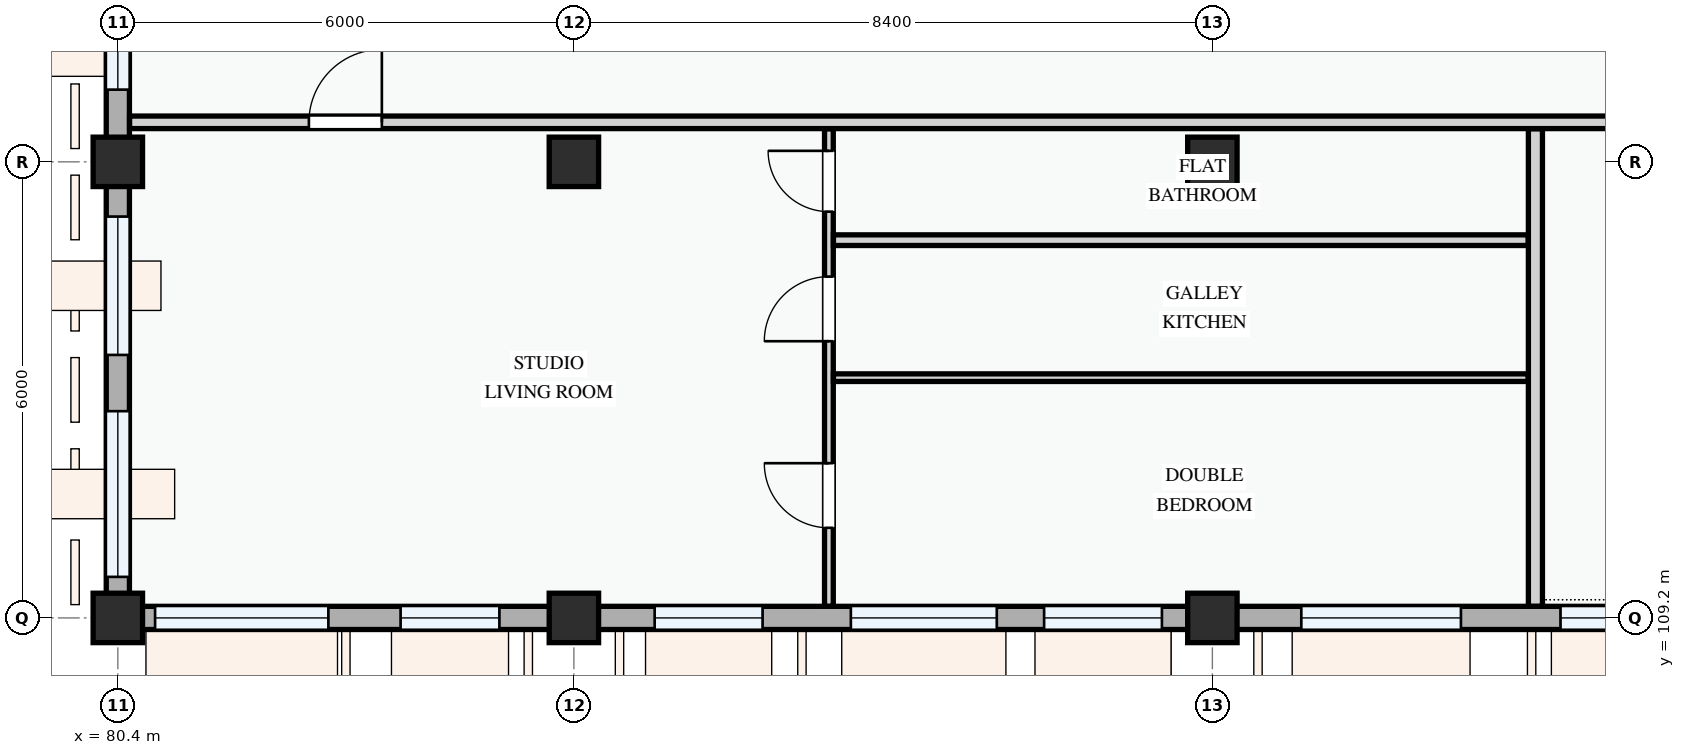
"""IFC4 building model, lengths in metres.
Left out: names, types, materials, properties, quantities, classifications, styles, units other than length and angle.
Written with IfcOpenShell. Run it as: python <this file> out.ifc"""

import sys

from ifc_helpers import new_model, si_unit, direction, frame, frame_2d, origin, origin_2d, place, context, subcontext, project, spatial, rectangle, extrude, element, fill, save


model = new_model("IFC4")
c1 = context("Model", 3, precision=1e-05, world=origin(), true_north=direction((0.0, 1.0)))
c2 = subcontext(c1, "Body", "Model", "MODEL_VIEW")
j1 = project(units=[si_unit("LENGTHUNIT", "METRE"), si_unit("PLANEANGLEUNIT", "RADIAN")], contexts=[c1])
p1 = place(None, origin())
s1 = spatial("IfcSite", under=j1, at=p1, CompositionType="ELEMENT")
p2 = place(p1, origin())
s2 = spatial("IfcBuilding", under=s1, at=p2, CompositionType="ELEMENT")
p3 = place(p2, frame((0.0, 0.0, 21.3)))
s3 = spatial("IfcBuildingStorey", under=s2, at=p3, CompositionType="ELEMENT", Elevation=21.3)
for number, where, z_axis, x_axis in (
    (1, (80.4, 109.2, 0.0), (0.0, 0.0, 1.0), (1.0, 0.0, 0.0)),
    (2, (80.4, 115.2, 0.0), (0.0, 0.0, 1.0), (1.0, 0.0, 0.0)),
    (3, (86.4, 109.2, 0.0), (0.0, 0.0, 1.0), (1.0, 0.0, 0.0)),
    (4, (86.4, 115.2, 0.0), (0.0, 0.0, 1.0), (1.0, 0.0, 0.0)),
    (5, (94.8, 109.2, 0.0), (0.0, 0.0, 1.0), (1.0, 0.0, 0.0)),
    (6, (94.8, 115.2, 0.0), (0.0, 0.0, 1.0), (1.0, 0.0, 0.0)),
):
    element("IfcColumn", number, at=place(p3, frame(where, z_axis=z_axis, x_axis=x_axis)), inside=s3, PredefinedType="COLUMN", context=c2, shape_type="SweptSolid", body=[
        extrude(rectangle(XDim=0.65, YDim=0.65, at=origin_2d()), origin(), (0.0, 0.0, 1.0), 3.3),
    ])
p4 = place(p3, frame((80.4, 123.6, 0.0), z_axis=(0.0, 0.0, 1.0), x_axis=(0.0, -1.0, 0.0)))
e7 = element("IfcWall", 7, at=p4, inside=s3, PredefinedType="STANDARD", context=c2, shape_type="SweptSolid", body=[
    extrude(rectangle(XDim=8.4, YDim=0.305, at=frame_2d((4.2, 0.0))), origin(), (0.0, 0.0, 1.0), 2.425),
])
p5 = place(p4, frame((0.893, 0.0, 0.78)))
e8 = element("IfcOpeningElement", 8, at=p5, cuts=e7, PredefinedType="OPENING", context=c2, shape_type="SweptSolid", body=[
    extrude(rectangle(XDim=1.58, YDim=1.48, at=frame_2d((0.79, 0.74))), frame((0.0, 0.163, 0.0), z_axis=(0.0, -1.0, 0.0), x_axis=(1.0, 0.0, 0.0)), (0.0, 0.0, 1.0), 0.325),
])
p6 = place(p4, frame((3.567, 0.0, 0.78)))
e9 = element("IfcOpeningElement", 9, at=p6, cuts=e7, PredefinedType="OPENING", context=c2, shape_type="SweptSolid", body=[
    extrude(rectangle(XDim=1.92, YDim=1.44, at=frame_2d((0.96, 0.72))), frame((0.0, 0.163, 0.0), z_axis=(0.0, -1.0, 0.0), x_axis=(1.0, 0.0, 0.0)), (0.0, 0.0, 1.0), 0.325),
])
p7 = place(p4, frame((6.45, 0.0, 0.78)))
e10 = element("IfcOpeningElement", 10, at=p7, cuts=e7, PredefinedType="OPENING", context=c2, shape_type="SweptSolid", body=[
    extrude(rectangle(XDim=1.0, YDim=1.25, at=frame_2d((0.5, 0.625))), frame((0.0, 0.163, 0.0), z_axis=(0.0, -1.0, 0.0), x_axis=(1.0, 0.0, 0.0)), (0.0, 0.0, 1.0), 0.325),
])
p8 = place(p3, frame((80.4, 115.2, 0.0), z_axis=(0.0, 0.0, 1.0), x_axis=(0.0, -1.0, 0.0)))
e11 = element("IfcWall", 11, at=p8, inside=s3, PredefinedType="STANDARD", context=c2, shape_type="SweptSolid", body=[
    extrude(rectangle(XDim=6.0, YDim=0.305, at=frame_2d((3.0, 0.0))), origin(), (0.0, 0.0, 1.0), 2.575),
])
p9 = place(p8, frame((0.72, 0.0, 0.78)))
e12 = element("IfcOpeningElement", 12, at=p9, cuts=e11, PredefinedType="OPENING", context=c2, shape_type="SweptSolid", body=[
    extrude(rectangle(XDim=1.82, YDim=1.46, at=frame_2d((0.91, 0.73))), frame((0.0, 0.163, 0.0), z_axis=(0.0, -1.0, 0.0), x_axis=(1.0, 0.0, 0.0)), (0.0, 0.0, 1.0), 0.325),
])
p10 = place(p8, frame((3.28, 0.0, 0.78)))
e13 = element("IfcOpeningElement", 13, at=p10, cuts=e11, PredefinedType="OPENING", context=c2, shape_type="SweptSolid", body=[
    extrude(rectangle(XDim=2.18, YDim=1.48, at=frame_2d((1.09, 0.74))), frame((0.0, 0.163, 0.0), z_axis=(0.0, -1.0, 0.0), x_axis=(1.0, 0.0, 0.0)), (0.0, 0.0, 1.0), 0.325),
])
p11 = place(p3, frame((80.4, 109.2, 0.0), z_axis=(0.0, 0.0, 1.0), x_axis=(1.0, 0.0, 0.0)))
e14 = element("IfcWall", 14, at=p11, inside=s3, PredefinedType="STANDARD", context=c2, shape_type="SweptSolid", body=[
    extrude(rectangle(XDim=6.0, YDim=0.305, at=frame_2d((3.0, 0.0))), origin(), (0.0, 0.0, 1.0), 2.475),
])
p12 = place(p11, frame((0.49, 0.0, 0.78)))
e15 = element("IfcOpeningElement", 15, at=p12, cuts=e14, PredefinedType="OPENING", context=c2, shape_type="SweptSolid", body=[
    extrude(rectangle(XDim=2.28, YDim=1.46, at=frame_2d((1.14, 0.73))), frame((0.0, 0.163, 0.0), z_axis=(0.0, -1.0, 0.0), x_axis=(1.0, 0.0, 0.0)), (0.0, 0.0, 1.0), 0.325),
])
p13 = place(p11, frame((3.72, 0.0, 0.78)))
e16 = element("IfcOpeningElement", 16, at=p13, cuts=e14, PredefinedType="OPENING", context=c2, shape_type="SweptSolid", body=[
    extrude(rectangle(XDim=1.3, YDim=1.4, at=frame_2d((0.65, 0.7))), frame((0.0, 0.163, 0.0), z_axis=(0.0, -1.0, 0.0), x_axis=(1.0, 0.0, 0.0)), (0.0, 0.0, 1.0), 0.325),
])
p14 = place(p3, frame((86.4, 109.2, 0.0), z_axis=(0.0, 0.0, 1.0), x_axis=(1.0, 0.0, 0.0)))
e17 = element("IfcWall", 17, at=p14, inside=s3, PredefinedType="STANDARD", context=c2, shape_type="SweptSolid", body=[
    extrude(rectangle(XDim=8.4, YDim=0.305, at=frame_2d((4.2, 0.0))), origin(), (0.0, 0.0, 1.0), 2.375),
])
p15 = place(p14, frame((1.062, 0.0, 0.78)))
e18 = element("IfcOpeningElement", 18, at=p15, cuts=e17, PredefinedType="OPENING", context=c2, shape_type="SweptSolid", body=[
    extrude(rectangle(XDim=1.42, YDim=1.38, at=frame_2d((0.71, 0.69))), frame((0.0, 0.163, 0.0), z_axis=(0.0, -1.0, 0.0), x_axis=(1.0, 0.0, 0.0)), (0.0, 0.0, 1.0), 0.325),
])
p16 = place(p14, frame((3.644, 0.0, 0.78)))
e19 = element("IfcOpeningElement", 19, at=p16, cuts=e17, PredefinedType="OPENING", context=c2, shape_type="SweptSolid", body=[
    extrude(rectangle(XDim=1.92, YDim=1.44, at=frame_2d((0.96, 0.72))), frame((0.0, 0.163, 0.0), z_axis=(0.0, -1.0, 0.0), x_axis=(1.0, 0.0, 0.0)), (0.0, 0.0, 1.0), 0.325),
])
p17 = place(p14, frame((6.186, 0.0, 0.78)))
e20 = element("IfcOpeningElement", 20, at=p17, cuts=e17, PredefinedType="OPENING", context=c2, shape_type="SweptSolid", body=[
    extrude(rectangle(XDim=1.55, YDim=1.4, at=frame_2d((0.775, 0.7))), frame((0.0, 0.163, 0.0), z_axis=(0.0, -1.0, 0.0), x_axis=(1.0, 0.0, 0.0)), (0.0, 0.0, 1.0), 0.325),
])
p18 = place(p3, frame((94.8, 109.2, 0.0), z_axis=(0.0, 0.0, 1.0), x_axis=(1.0, 0.0, 0.0)))
e21 = element("IfcWall", 21, at=p18, inside=s3, PredefinedType="STANDARD", context=c2, shape_type="SweptSolid", body=[
    extrude(rectangle(XDim=6.0, YDim=0.305, at=frame_2d((3.0, 0.0))), origin(), (0.0, 0.0, 1.0), 2.475),
])
p19 = place(p18, frame((1.17, 0.0, 0.78)))
e22 = element("IfcOpeningElement", 22, at=p19, cuts=e21, PredefinedType="OPENING", context=c2, shape_type="SweptSolid", body=[
    extrude(rectangle(XDim=2.1, YDim=1.55, at=frame_2d((1.05, 0.775))), frame((0.0, 0.163, 0.0), z_axis=(0.0, -1.0, 0.0), x_axis=(1.0, 0.0, 0.0)), (0.0, 0.0, 1.0), 0.325),
])
p20 = place(p18, frame((4.58, 0.0, 0.78)))
e23 = element("IfcOpeningElement", 23, at=p20, cuts=e21, PredefinedType="OPENING", context=c2, shape_type="SweptSolid", body=[
    extrude(rectangle(XDim=0.9, YDim=1.2, at=frame_2d((0.45, 0.6))), frame((0.0, 0.163, 0.0), z_axis=(0.0, -1.0, 0.0), x_axis=(1.0, 0.0, 0.0)), (0.0, 0.0, 1.0), 0.325),
])
p21 = place(p3, frame((89.755, 109.354, 0.0), z_axis=(0.0, 0.0, 1.0), x_axis=(0.0, 1.0, 0.0)))
e24 = element("IfcWall", 24, at=p21, inside=s3, PredefinedType="PARTITIONING", context=c2, shape_type="SweptSolid", body=[
    extrude(rectangle(XDim=6.281, YDim=0.115, at=frame_2d((3.141, 0.0))), origin(), (0.0, 0.0, 1.0), 3.0),
])
p22 = place(p21, frame((1.031, 0.0, 0.0)))
e25 = element("IfcOpeningElement", 25, at=p22, cuts=e24, PredefinedType="OPENING", context=c2, shape_type="SweptSolid", body=[
    extrude(rectangle(XDim=0.85, YDim=2.1, at=frame_2d((0.425, 1.05))), frame((0.0, 0.067, 0.0), z_axis=(0.0, -1.0, 0.0), x_axis=(1.0, 0.0, 0.0)), (0.0, 0.0, 1.0), 0.135),
])
p23 = place(p21, frame((3.486, 0.0, 0.0)))
e26 = element("IfcOpeningElement", 26, at=p23, cuts=e24, PredefinedType="OPENING", context=c2, shape_type="SweptSolid", body=[
    extrude(rectangle(XDim=0.85, YDim=2.1, at=frame_2d((0.425, 1.05))), frame((0.0, 0.067, 0.0), z_axis=(0.0, -1.0, 0.0), x_axis=(1.0, 0.0, 0.0)), (0.0, 0.0, 1.0), 0.135),
])
p24 = place(p21, frame((5.19, 0.0, 0.0)))
e27 = element("IfcOpeningElement", 27, at=p24, cuts=e24, PredefinedType="OPENING", context=c2, shape_type="SweptSolid", body=[
    extrude(rectangle(XDim=0.8, YDim=2.1, at=frame_2d((0.4, 1.05))), frame((0.0, 0.067, 0.0), z_axis=(0.0, -1.0, 0.0), x_axis=(1.0, 0.0, 0.0)), (0.0, 0.0, 1.0), 0.135),
])
p25 = place(p3, frame((89.814, 112.361, 0.0), z_axis=(0.0, 0.0, 1.0), x_axis=(1.0, 0.0, 0.0)))
e28 = element("IfcWall", 28, at=p25, inside=s3, PredefinedType="PARTITIONING", context=c2, shape_type="SweptSolid", body=[
    extrude(rectangle(XDim=9.141, YDim=0.1, at=frame_2d((4.571, 0.0))), origin(), (0.0, 0.0, 1.0), 3.0),
])
p26 = place(p3, frame((89.814, 114.17, 0.0), z_axis=(0.0, 0.0, 1.0), x_axis=(1.0, 0.0, 0.0)))
e29 = element("IfcWall", 29, at=p26, inside=s3, PredefinedType="PARTITIONING", context=c2, shape_type="SweptSolid", body=[
    extrude(rectangle(XDim=9.141, YDim=0.14, at=frame_2d((4.571, 0.0))), origin(), (0.0, 0.0, 1.0), 3.0),
])
p27 = place(p3, frame((99.05, 109.354, 0.0), z_axis=(0.0, 0.0, 1.0), x_axis=(0.0, 1.0, 0.0)))
e30 = element("IfcWall", 30, at=p27, inside=s3, PredefinedType="PARTITIONING", context=c2, shape_type="SweptSolid", body=[
    extrude(rectangle(XDim=6.281, YDim=0.185, at=frame_2d((3.141, 0.0))), origin(), (0.0, 0.0, 1.0), 3.0),
])
p28 = place(p3, frame((80.554, 115.72, 0.0), z_axis=(0.0, 0.0, 1.0), x_axis=(1.0, 0.0, 0.0)))
e31 = element("IfcWall", 31, at=p28, inside=s3, PredefinedType="PARTITIONING", context=c2, shape_type="SweptSolid", body=[
    extrude(rectangle(XDim=69.496, YDim=0.165, at=frame_2d((34.748, 0.0))), origin(), (0.0, 0.0, 1.0), 3.0),
])
p29 = place(p28, frame((2.359, 0.0, 0.0)))
e32 = element("IfcOpeningElement", 32, at=p29, cuts=e31, PredefinedType="OPENING", context=c2, shape_type="SweptSolid", body=[
    extrude(rectangle(XDim=0.96, YDim=2.12, at=frame_2d((0.48, 1.06))), frame((0.0, 0.093, 0.0), z_axis=(0.0, -1.0, 0.0), x_axis=(1.0, 0.0, 0.0)), (0.0, 0.0, 1.0), 0.185),
])
p30 = place(p28, frame((23.96, 0.0, 0.0)))
e33 = element("IfcOpeningElement", 33, at=p30, cuts=e31, PredefinedType="OPENING", context=c2, shape_type="SweptSolid", body=[
    extrude(rectangle(XDim=0.92, YDim=2.1, at=frame_2d((0.46, 1.05))), frame((0.0, 0.093, 0.0), z_axis=(0.0, -1.0, 0.0), x_axis=(1.0, 0.0, 0.0)), (0.0, 0.0, 1.0), 0.185),
])
p31 = place(p28, frame((39.125, 0.0, 0.0)))
e34 = element("IfcOpeningElement", 34, at=p31, cuts=e31, PredefinedType="OPENING", context=c2, shape_type="SweptSolid", body=[
    extrude(rectangle(XDim=0.92, YDim=2.1, at=frame_2d((0.46, 1.05))), frame((0.0, 0.093, 0.0), z_axis=(0.0, -1.0, 0.0), x_axis=(1.0, 0.0, 0.0)), (0.0, 0.0, 1.0), 0.185),
])
p32 = place(p28, frame((59.901, 0.0, 0.0)))
e35 = element("IfcOpeningElement", 35, at=p32, cuts=e31, PredefinedType="OPENING", context=c2, shape_type="SweptSolid", body=[
    extrude(rectangle(XDim=0.92, YDim=2.1, at=frame_2d((0.46, 1.05))), frame((0.0, 0.093, 0.0), z_axis=(0.0, -1.0, 0.0), x_axis=(1.0, 0.0, 0.0)), (0.0, 0.0, 1.0), 0.185),
])
p33 = place(p7, origin())
e36 = element("IfcWindow", 36, at=p33, inside=s3, PartitioningType="SINGLE_PANEL", PredefinedType="WINDOW", context=c2, shape_type="SweptSolid", body=[
    extrude(rectangle(XDim=1.0, YDim=1.25, at=frame_2d((0.5, 0.625))), frame((0.0, 0.03, 0.0), z_axis=(0.0, -1.0, 0.0), x_axis=(1.0, 0.0, 0.0)), (0.0, 0.0, 1.0), 0.06),
])
fill(e10, e36)
p34 = place(p9, origin())
e37 = element("IfcWindow", 37, at=p34, inside=s3, PartitioningType="DOUBLE_PANEL_VERTICAL", PredefinedType="WINDOW", context=c2, shape_type="SweptSolid", body=[
    extrude(rectangle(XDim=1.82, YDim=1.46, at=frame_2d((0.91, 0.73))), frame((0.0, 0.03, 0.0), z_axis=(0.0, -1.0, 0.0), x_axis=(1.0, 0.0, 0.0)), (0.0, 0.0, 1.0), 0.06),
])
fill(e12, e37)
p35 = place(p10, origin())
e38 = element("IfcWindow", 38, at=p35, inside=s3, PartitioningType="DOUBLE_PANEL_VERTICAL", PredefinedType="WINDOW", context=c2, shape_type="SweptSolid", body=[
    extrude(rectangle(XDim=2.18, YDim=1.48, at=frame_2d((1.09, 0.74))), frame((0.0, 0.03, 0.0), z_axis=(0.0, -1.0, 0.0), x_axis=(1.0, 0.0, 0.0)), (0.0, 0.0, 1.0), 0.06),
])
fill(e13, e38)
p36 = place(p12, origin())
e39 = element("IfcWindow", 39, at=p36, inside=s3, PartitioningType="DOUBLE_PANEL_VERTICAL", PredefinedType="WINDOW", context=c2, shape_type="SweptSolid", body=[
    extrude(rectangle(XDim=2.28, YDim=1.46, at=frame_2d((1.14, 0.73))), frame((0.0, 0.03, 0.0), z_axis=(0.0, -1.0, 0.0), x_axis=(1.0, 0.0, 0.0)), (0.0, 0.0, 1.0), 0.06),
])
fill(e15, e39)
p37 = place(p13, origin())
e40 = element("IfcWindow", 40, at=p37, inside=s3, PartitioningType="SINGLE_PANEL", PredefinedType="WINDOW", context=c2, shape_type="SweptSolid", body=[
    extrude(rectangle(XDim=1.3, YDim=1.4, at=frame_2d((0.65, 0.7))), frame((0.0, 0.03, 0.0), z_axis=(0.0, -1.0, 0.0), x_axis=(1.0, 0.0, 0.0)), (0.0, 0.0, 1.0), 0.06),
])
fill(e16, e40)
p38 = place(p15, origin())
e41 = element("IfcWindow", 41, at=p38, inside=s3, PartitioningType="SINGLE_PANEL", PredefinedType="WINDOW", context=c2, shape_type="SweptSolid", body=[
    extrude(rectangle(XDim=1.42, YDim=1.38, at=frame_2d((0.71, 0.69))), frame((0.0, 0.03, 0.0), z_axis=(0.0, -1.0, 0.0), x_axis=(1.0, 0.0, 0.0)), (0.0, 0.0, 1.0), 0.06),
])
fill(e18, e41)
p39 = place(p16, origin())
e42 = element("IfcWindow", 42, at=p39, inside=s3, PartitioningType="DOUBLE_PANEL_VERTICAL", PredefinedType="WINDOW", context=c2, shape_type="SweptSolid", body=[
    extrude(rectangle(XDim=1.92, YDim=1.44, at=frame_2d((0.96, 0.72))), frame((0.0, 0.03, 0.0), z_axis=(0.0, -1.0, 0.0), x_axis=(1.0, 0.0, 0.0)), (0.0, 0.0, 1.0), 0.06),
])
fill(e19, e42)
p40 = place(p17, origin())
e43 = element("IfcWindow", 43, at=p40, inside=s3, PartitioningType="SINGLE_PANEL", PredefinedType="WINDOW", context=c2, shape_type="SweptSolid", body=[
    extrude(rectangle(XDim=1.55, YDim=1.4, at=frame_2d((0.775, 0.7))), frame((0.0, 0.03, 0.0), z_axis=(0.0, -1.0, 0.0), x_axis=(1.0, 0.0, 0.0)), (0.0, 0.0, 1.0), 0.06),
])
fill(e20, e43)
p41 = place(p19, origin())
e44 = element("IfcWindow", 44, at=p41, inside=s3, PartitioningType="DOUBLE_PANEL_VERTICAL", PredefinedType="WINDOW", context=c2, shape_type="SweptSolid", body=[
    extrude(rectangle(XDim=2.1, YDim=1.55, at=frame_2d((1.05, 0.775))), frame((0.0, 0.03, 0.0), z_axis=(0.0, -1.0, 0.0), x_axis=(1.0, 0.0, 0.0)), (0.0, 0.0, 1.0), 0.06),
])
fill(e22, e44)
p42 = place(p20, origin())
e45 = element("IfcWindow", 45, at=p42, inside=s3, PartitioningType="SINGLE_PANEL", PredefinedType="WINDOW", context=c2, shape_type="SweptSolid", body=[
    extrude(rectangle(XDim=0.9, YDim=1.2, at=frame_2d((0.45, 0.6))), frame((0.0, 0.03, 0.0), z_axis=(0.0, -1.0, 0.0), x_axis=(1.0, 0.0, 0.0)), (0.0, 0.0, 1.0), 0.06),
])
fill(e23, e45)
p43 = place(p22, origin())
e46 = element("IfcDoor", 46, at=p43, inside=s3, OperationType="SINGLE_SWING_RIGHT", PredefinedType="DOOR", context=c2, shape_type="SweptSolid", body=[
    extrude(rectangle(XDim=0.85, YDim=2.1, at=frame_2d((0.425, 1.05))), frame((0.0, 0.025, 0.0), z_axis=(0.0, -1.0, 0.0), x_axis=(1.0, 0.0, 0.0)), (0.0, 0.0, 1.0), 0.05),
])
fill(e25, e46)
p44 = place(p23, origin())
e47 = element("IfcDoor", 47, at=p44, inside=s3, OperationType="SINGLE_SWING_LEFT", PredefinedType="DOOR", context=c2, shape_type="SweptSolid", body=[
    extrude(rectangle(XDim=0.85, YDim=2.1, at=frame_2d((0.425, 1.05))), frame((0.0, 0.025, 0.0), z_axis=(0.0, -1.0, 0.0), x_axis=(1.0, 0.0, 0.0)), (0.0, 0.0, 1.0), 0.05),
])
fill(e26, e47)
p45 = place(p24, origin())
e48 = element("IfcDoor", 48, at=p45, inside=s3, OperationType="SINGLE_SWING_RIGHT", PredefinedType="DOOR", context=c2, shape_type="SweptSolid", body=[
    extrude(rectangle(XDim=0.8, YDim=2.1, at=frame_2d((0.4, 1.05))), frame((0.0, 0.025, 0.0), z_axis=(0.0, -1.0, 0.0), x_axis=(1.0, 0.0, 0.0)), (0.0, 0.0, 1.0), 0.05),
])
fill(e27, e48)
p46 = place(p29, origin())
e49 = element("IfcDoor", 49, at=p46, inside=s3, OperationType="SINGLE_SWING_RIGHT", PredefinedType="DOOR", context=c2, shape_type="SweptSolid", body=[
    extrude(rectangle(XDim=0.96, YDim=2.12, at=frame_2d((0.48, 1.06))), frame((0.0, 0.025, 0.0), z_axis=(0.0, -1.0, 0.0), x_axis=(1.0, 0.0, 0.0)), (0.0, 0.0, 1.0), 0.05),
])
fill(e32, e49)
save(model, sys.argv[1])
